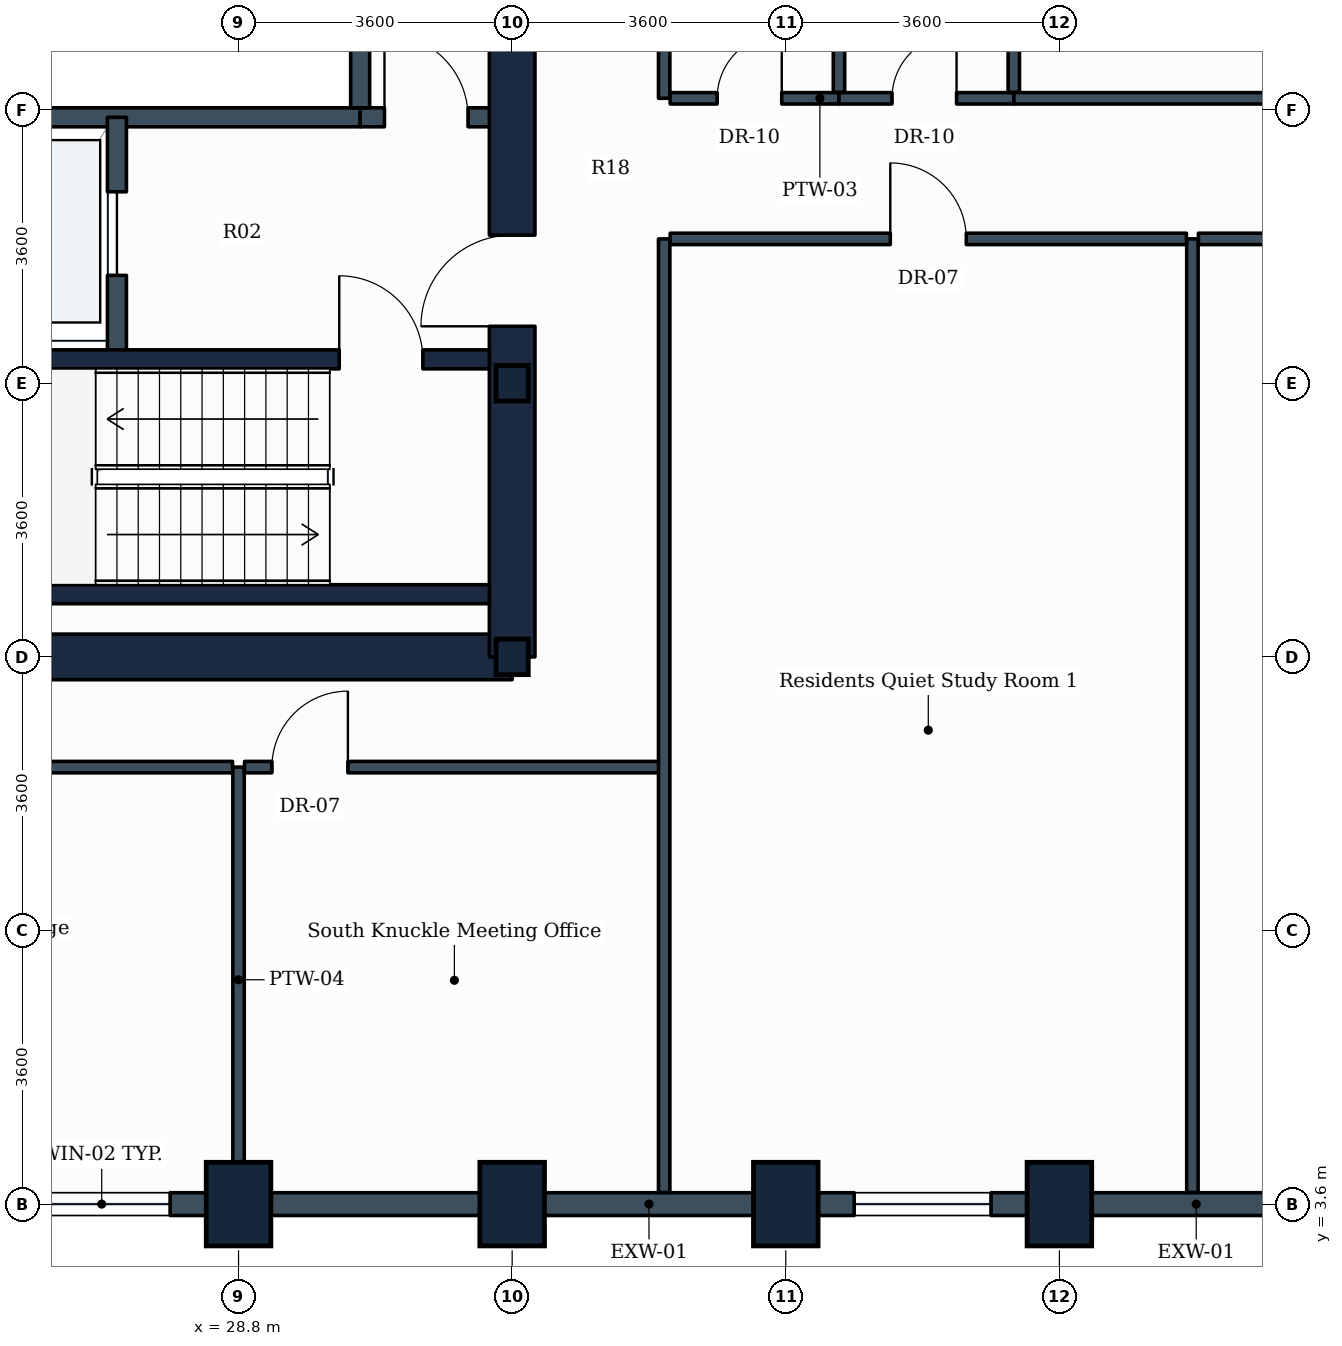
"""IFC4 building model, lengths in metres.
Left out: names, types, materials, properties, quantities, classifications, styles, units other than length and angle.
Written with IfcOpenShell. Run it as: python <this file> out.ifc"""

import sys

from ifc_helpers import new_model, si_unit, direction, frame, frame_2d, origin, origin_2d, place, context, subcontext, project, spatial, rectangle, i_section, extrude, element, fill, save


model = new_model("IFC4")
c1 = context("Model", 3, precision=1e-05, world=origin(), true_north=direction((0.0, 1.0)))
c2 = subcontext(c1, "Body", "Model", "MODEL_VIEW")
j1 = project(units=[si_unit("LENGTHUNIT", "METRE"), si_unit("PLANEANGLEUNIT", "RADIAN")], contexts=[c1])
p1 = place(None, origin())
s1 = spatial("IfcSite", under=j1, at=p1, CompositionType="ELEMENT")
p2 = place(p1, origin())
s2 = spatial("IfcBuilding", under=s1, at=p2, CompositionType="ELEMENT")
p3 = place(p2, frame((0.0, 0.0, 111.3)))
s3 = spatial("IfcBuildingStorey", under=s2, at=p3, CompositionType="ELEMENT", Elevation=111.3)
for number, where, z_axis, x_axis in (
    (1, (28.8, 3.6, 0.0), (0.0, 0.0, 1.0), (1.0, 0.0, 0.0)),
    (2, (32.4, 3.6, 0.0), (0.0, 0.0, 1.0), (1.0, 0.0, 0.0)),
):
    element("IfcColumn", number, at=place(p3, frame(where, z_axis=z_axis, x_axis=x_axis)), inside=s3, PredefinedType="COLUMN", context=c2, shape_type="SweptSolid", body=[
        extrude(rectangle(XDim=0.85, YDim=1.1, at=origin_2d()), origin(), (0.0, 0.0, 1.0), 3.9),
    ])
for number, where, z_axis, x_axis in (
    (3, (32.4, 10.8, 0.0), (0.0, 0.0, 1.0), (1.0, 0.0, 0.0)),
    (4, (32.4, 14.4, 0.0), (0.0, 0.0, 1.0), (1.0, 0.0, 0.0)),
):
    element("IfcColumn", number, at=place(p3, frame(where, z_axis=z_axis, x_axis=x_axis)), inside=s3, PredefinedType="COLUMN", context=c2, shape_type="SweptSolid", body=[
        extrude(i_section(OverallWidth=0.424, OverallDepth=0.467, WebThickness=0.033, FlangeThickness=0.053, FilletRadius=0.015, at=origin_2d()), origin(), (0.0, 0.0, 1.0), 3.9),
    ])
for number, where, z_axis, x_axis in (
    (5, (36.0, 3.6, 0.0), (0.0, 0.0, 1.0), (1.0, 0.0, 0.0)),
    (6, (39.6, 3.6, 0.0), (0.0, 0.0, 1.0), (1.0, 0.0, 0.0)),
):
    element("IfcColumn", number, at=place(p3, frame(where, z_axis=z_axis, x_axis=x_axis)), inside=s3, PredefinedType="COLUMN", context=c2, shape_type="SweptSolid", body=[
        extrude(rectangle(XDim=0.85, YDim=1.1, at=origin_2d()), origin(), (0.0, 0.0, 1.0), 3.9),
    ])
p4 = place(p3, frame((28.8, 3.6, 0.0), z_axis=(0.0, 0.0, 1.0), x_axis=(-1.0, 0.0, 0.0)))
e7 = element("IfcWall", 7, at=p4, inside=s3, PredefinedType="STANDARD", context=c2, shape_type="SweptSolid", body=[
    extrude(rectangle(XDim=3.6, YDim=0.3, at=frame_2d((1.8, 0.0))), origin(), (0.0, 0.0, 1.0), 3.03),
])
p5 = place(p4, frame((0.9, 0.0, 0.85)))
e8 = element("IfcOpeningElement", 8, at=p5, cuts=e7, PredefinedType="OPENING", context=c2, shape_type="SweptSolid", body=[
    extrude(rectangle(XDim=1.8, YDim=1.35, at=frame_2d((0.9, 0.675))), frame((0.0, 0.16, 0.0), z_axis=(0.0, -1.0, 0.0), x_axis=(1.0, 0.0, 0.0)), (0.0, 0.0, 1.0), 0.32),
])
p6 = place(p3, frame((32.4, 3.6, 0.0), z_axis=(0.0, 0.0, 1.0), x_axis=(-1.0, 0.0, 0.0)))
e9 = element("IfcWall", 9, at=p6, inside=s3, PredefinedType="STANDARD", context=c2, shape_type="SweptSolid", body=[
    extrude(rectangle(XDim=3.6, YDim=0.3, at=frame_2d((1.8, 0.0))), origin(), (0.0, 0.0, 1.0), 3.03),
])
p7 = place(p3, frame((36.0, 3.6, 0.0), z_axis=(0.0, 0.0, 1.0), x_axis=(-1.0, 0.0, 0.0)))
e10 = element("IfcWall", 10, at=p7, inside=s3, PredefinedType="STANDARD", context=c2, shape_type="SweptSolid", body=[
    extrude(rectangle(XDim=3.6, YDim=0.3, at=frame_2d((1.8, 0.0))), origin(), (0.0, 0.0, 1.0), 3.03),
])
p8 = place(p3, frame((39.6, 3.6, 0.0), z_axis=(0.0, 0.0, 1.0), x_axis=(-1.0, 0.0, 0.0)))
e11 = element("IfcWall", 11, at=p8, inside=s3, PredefinedType="STANDARD", context=c2, shape_type="SweptSolid", body=[
    extrude(rectangle(XDim=3.6, YDim=0.3, at=frame_2d((1.8, 0.0))), origin(), (0.0, 0.0, 1.0), 3.03),
])
p9 = place(p8, frame((0.9, 0.0, 0.85)))
e12 = element("IfcOpeningElement", 12, at=p9, cuts=e11, PredefinedType="OPENING", context=c2, shape_type="SweptSolid", body=[
    extrude(rectangle(XDim=1.8, YDim=1.35, at=frame_2d((0.9, 0.675))), frame((0.0, 0.16, 0.0), z_axis=(0.0, -1.0, 0.0), x_axis=(1.0, 0.0, 0.0)), (0.0, 0.0, 1.0), 0.32),
])
p10 = place(p3, frame((43.2, 3.6, 0.0), z_axis=(0.0, 0.0, 1.0), x_axis=(-1.0, 0.0, 0.0)))
e13 = element("IfcWall", 13, at=p10, inside=s3, PredefinedType="STANDARD", context=c2, shape_type="SweptSolid", body=[
    extrude(rectangle(XDim=3.6, YDim=0.3, at=frame_2d((1.8, 0.0))), origin(), (0.0, 0.0, 1.0), 3.03),
])
p11 = place(p3, frame((14.4, 10.8, 0.0), z_axis=(0.0, 0.0, 1.0), x_axis=(1.0, 0.0, 0.0)))
e14 = element("IfcWall", 14, at=p11, inside=s3, PredefinedType="SHEAR", context=c2, shape_type="SweptSolid", body=[
    extrude(rectangle(XDim=18.0, YDim=0.6, at=frame_2d((9.0, 0.0))), origin(), (0.0, 0.0, 1.0), 3.58),
])
p12 = place(p3, frame((32.4, 10.8, 0.0), z_axis=(0.0, 0.0, 1.0), x_axis=(0.0, 1.0, 0.0)))
e15 = element("IfcWall", 15, at=p12, inside=s3, PredefinedType="SHEAR", context=c2, shape_type="SweptSolid", body=[
    extrude(rectangle(XDim=14.4, YDim=0.6, at=frame_2d((7.2, 0.0))), origin(), (0.0, 0.0, 1.0), 3.58),
])
p13 = place(p12, frame((4.35, 0.0, 0.0)))
e16 = element("IfcOpeningElement", 16, at=p13, cuts=e15, PredefinedType="OPENING", context=c2, shape_type="SweptSolid", body=[
    extrude(rectangle(XDim=1.2, YDim=2.1, at=frame_2d((0.6, 1.05))), frame((0.0, 0.31, 0.0), z_axis=(0.0, -1.0, 0.0), x_axis=(1.0, 0.0, 0.0)), (0.0, 0.0, 1.0), 0.62),
])
p14 = place(p12, frame((10.0, 0.0, 0.0)))
e17 = element("IfcOpeningElement", 17, at=p14, cuts=e15, PredefinedType="OPENING", context=c2, shape_type="SweptSolid", body=[
    extrude(rectangle(XDim=1.2, YDim=2.1, at=frame_2d((0.6, 1.05))), frame((0.0, 0.31, 0.0), z_axis=(0.0, -1.0, 0.0), x_axis=(1.0, 0.0, 0.0)), (0.0, 0.0, 1.0), 0.62),
])
p15 = place(p3, frame((23.35, 11.625, 0.0), z_axis=(0.0, 0.0, 1.0), x_axis=(1.0, 0.0, 0.0)))
e18 = element("IfcWall", 18, at=p15, inside=s3, PredefinedType="SHEAR", context=c2, shape_type="SweptSolid", body=[
    extrude(rectangle(XDim=8.75, YDim=0.25, at=frame_2d((4.375, 0.0))), origin(), (0.0, 0.0, 1.0), 3.58),
])
p16 = place(p3, frame((23.35, 14.715, 0.0), z_axis=(0.0, 0.0, 1.0), x_axis=(1.0, 0.0, 0.0)))
e19 = element("IfcWall", 19, at=p16, inside=s3, PredefinedType="SHEAR", context=c2, shape_type="SweptSolid", body=[
    extrude(rectangle(XDim=8.75, YDim=0.25, at=frame_2d((4.375, 0.0))), origin(), (0.0, 0.0, 1.0), 3.58),
])
p17 = place(p16, frame((6.775, 0.0, 0.0)))
e20 = element("IfcOpeningElement", 20, at=p17, cuts=e19, PredefinedType="OPENING", context=c2, shape_type="SweptSolid", body=[
    extrude(rectangle(XDim=1.1, YDim=2.1, at=frame_2d((0.55, 1.05))), frame((0.0, 0.135, 0.0), z_axis=(0.0, -1.0, 0.0), x_axis=(1.0, 0.0, 0.0)), (0.0, 0.0, 1.0), 0.27),
])
p18 = place(p3, frame((21.88, 17.9, 0.0), z_axis=(0.0, 0.0, 1.0), x_axis=(1.0, 0.0, 0.0)))
e21 = element("IfcWall", 21, at=p18, inside=s3, PredefinedType="PARTITIONING", context=c2, shape_type="SweptSolid", body=[
    extrude(rectangle(XDim=8.52, YDim=0.25, at=frame_2d((4.26, 0.0))), origin(), (0.0, 0.0, 1.0), 3.565),
])
p19 = place(p3, frame((30.4, 17.9, 0.0), z_axis=(0.0, 0.0, 1.0), x_axis=(1.0, 0.0, 0.0)))
e22 = element("IfcWall", 22, at=p19, inside=s3, PredefinedType="PARTITIONING", context=c2, shape_type="SweptSolid", body=[
    extrude(rectangle(XDim=1.75, YDim=0.25, at=frame_2d((0.875, 0.0))), origin(), (0.0, 0.0, 1.0), 3.565),
])
p20 = place(p19, frame((0.32, 0.0, 0.0)))
e23 = element("IfcOpeningElement", 23, at=p20, cuts=e22, PredefinedType="OPENING", context=c2, shape_type="SweptSolid", body=[
    extrude(rectangle(XDim=1.1, YDim=2.1, at=frame_2d((0.55, 1.05))), frame((0.0, 0.135, 0.0), z_axis=(0.0, -1.0, 0.0), x_axis=(1.0, 0.0, 0.0)), (0.0, 0.0, 1.0), 0.27),
])
p21 = place(p3, frame((27.2, 14.84, 0.0), z_axis=(0.0, 0.0, 1.0), x_axis=(0.0, 1.0, 0.0)))
e24 = element("IfcWall", 24, at=p21, inside=s3, PredefinedType="PARTITIONING", context=c2, shape_type="SweptSolid", body=[
    extrude(rectangle(XDim=3.06, YDim=0.25, at=frame_2d((1.53, 0.0))), origin(), (0.0, 0.0, 1.0), 3.565),
])
p22 = place(p21, frame((0.98, 0.0, 0.0)))
e25 = element("IfcOpeningElement", 25, at=p22, cuts=e24, PredefinedType="OPENING", context=c2, shape_type="SweptSolid", body=[
    extrude(rectangle(XDim=1.1, YDim=2.1, at=frame_2d((0.55, 1.05))), frame((0.0, 0.135, 0.0), z_axis=(0.0, -1.0, 0.0), x_axis=(1.0, 0.0, 0.0)), (0.0, 0.0, 1.0), 0.27),
])
p23 = place(p3, frame((30.4, 18.025, 0.0), z_axis=(0.0, 0.0, 1.0), x_axis=(0.0, 1.0, 0.0)))
e26 = element("IfcWall", 26, at=p23, inside=s3, PredefinedType="PARTITIONING", context=c2, shape_type="SweptSolid", body=[
    extrude(rectangle(XDim=2.27, YDim=0.25, at=frame_2d((1.135, 0.0))), origin(), (0.0, 0.0, 1.0), 3.565),
])
p24 = place(p3, frame((34.4, 18.15, 0.0), z_axis=(0.0, 0.0, 1.0), x_axis=(0.0, 1.0, 0.0)))
e27 = element("IfcWall", 27, at=p24, inside=s3, PredefinedType="PARTITIONING", context=c2, shape_type="SweptSolid", body=[
    extrude(rectangle(XDim=6.896, YDim=0.15, at=frame_2d((3.448, 0.0))), origin(), (0.0, 0.0, 1.0), 3.03),
])
p25 = place(p3, frame((34.479, 18.15, 0.0), z_axis=(0.0, 0.0, 1.0), x_axis=(1.0, 0.0, 0.0)))
e28 = element("IfcWall", 28, at=p25, inside=s3, PredefinedType="PARTITIONING", context=c2, shape_type="SweptSolid", body=[
    extrude(rectangle(XDim=2.221, YDim=0.15, at=frame_2d((1.11, 0.0))), origin(), (0.0, 0.0, 1.0), 3.11),
])
p26 = place(p25, frame((0.618, 0.0, 0.0)))
e29 = element("IfcOpeningElement", 29, at=p26, cuts=e28, PredefinedType="OPENING", context=c2, shape_type="SweptSolid", body=[
    extrude(rectangle(XDim=0.85, YDim=2.1, at=frame_2d((0.425, 1.05))), frame((0.0, 0.085, 0.0), z_axis=(0.0, -1.0, 0.0), x_axis=(1.0, 0.0, 0.0)), (0.0, 0.0, 1.0), 0.17),
])
p27 = place(p3, frame((36.7, 18.229, 0.0), z_axis=(0.0, 0.0, 1.0), x_axis=(0.0, 1.0, 0.0)))
e30 = element("IfcWall", 30, at=p27, inside=s3, PredefinedType="PARTITIONING", context=c2, shape_type="SweptSolid", body=[
    extrude(rectangle(XDim=6.817, YDim=0.15, at=frame_2d((3.408, 0.0))), origin(), (0.0, 0.0, 1.0), 3.03),
])
p28 = place(p3, frame((36.7, 18.15, 0.0), z_axis=(0.0, 0.0, 1.0), x_axis=(1.0, 0.0, 0.0)))
e31 = element("IfcWall", 31, at=p28, inside=s3, PredefinedType="PARTITIONING", context=c2, shape_type="SweptSolid", body=[
    extrude(rectangle(XDim=2.3, YDim=0.15, at=frame_2d((1.15, 0.0))), origin(), (0.0, 0.0, 1.0), 3.2),
])
p29 = place(p28, frame((0.697, 0.0, 0.0)))
e32 = element("IfcOpeningElement", 32, at=p29, cuts=e31, PredefinedType="OPENING", context=c2, shape_type="SweptSolid", body=[
    extrude(rectangle(XDim=0.85, YDim=2.1, at=frame_2d((0.425, 1.05))), frame((0.0, 0.085, 0.0), z_axis=(0.0, -1.0, 0.0), x_axis=(1.0, 0.0, 0.0)), (0.0, 0.0, 1.0), 0.17),
])
p30 = place(p3, frame((39.0, 18.229, 0.0), z_axis=(0.0, 0.0, 1.0), x_axis=(0.0, 1.0, 0.0)))
e33 = element("IfcWall", 33, at=p30, inside=s3, PredefinedType="PARTITIONING", context=c2, shape_type="SweptSolid", body=[
    extrude(rectangle(XDim=3.821, YDim=0.15, at=frame_2d((1.911, 0.0))), origin(), (0.0, 0.0, 1.0), 3.11),
])
p31 = place(p3, frame((28.8, 9.35, 0.0), z_axis=(0.0, 0.0, 1.0), x_axis=(0.0, -1.0, 0.0)))
e34 = element("IfcWall", 34, at=p31, inside=s3, PredefinedType="PARTITIONING", context=c2, shape_type="SweptSolid", body=[
    extrude(rectangle(XDim=5.596, YDim=0.15, at=frame_2d((2.798, 0.0))), origin(), (0.0, 0.0, 1.0), 3.565),
])
p32 = place(p3, frame((13.08, 9.35, 0.0), z_axis=(0.0, 0.0, 1.0), x_axis=(1.0, 0.0, 0.0)))
e35 = element("IfcWall", 35, at=p32, inside=s3, PredefinedType="PARTITIONING", context=c2, shape_type="SweptSolid", body=[
    extrude(rectangle(XDim=15.641, YDim=0.15, at=frame_2d((7.82, 0.0))), origin(), (0.0, 0.0, 1.0), 3.11),
])
p33 = place(p3, frame((28.879, 9.35, 0.0), z_axis=(0.0, 0.0, 1.0), x_axis=(1.0, 0.0, 0.0)))
e36 = element("IfcWall", 36, at=p33, inside=s3, PredefinedType="PARTITIONING", context=c2, shape_type="SweptSolid", body=[
    extrude(rectangle(XDim=5.521, YDim=0.15, at=frame_2d((2.76, 0.0))), origin(), (0.0, 0.0, 1.0), 3.565),
])
p34 = place(p33, frame((0.36, 0.0, 0.0)))
e37 = element("IfcOpeningElement", 37, at=p34, cuts=e36, PredefinedType="OPENING", context=c2, shape_type="SweptSolid", body=[
    extrude(rectangle(XDim=1.0, YDim=2.1, at=frame_2d((0.5, 1.05))), frame((0.0, 0.085, 0.0), z_axis=(0.0, -1.0, 0.0), x_axis=(1.0, 0.0, 0.0)), (0.0, 0.0, 1.0), 0.17),
])
for number, where, z_axis, x_axis in (
    (38, (34.4, 3.754, 0.0), (0.0, 0.0, 1.0), (0.0, 1.0, 0.0)),
    (39, (41.35, 3.754, 0.0), (0.0, 0.0, 1.0), (0.0, 1.0, 0.0)),
):
    element("IfcWall", number, at=place(p3, frame(where, z_axis=z_axis, x_axis=x_axis)), inside=s3, PredefinedType="PARTITIONING", context=c2, shape_type="SweptSolid", body=[
        extrude(rectangle(XDim=12.546, YDim=0.15, at=frame_2d((6.273, 0.0))), origin(), (0.0, 0.0, 1.0), 3.03),
    ])
p35 = place(p3, frame((34.479, 16.3, 0.0), z_axis=(0.0, 0.0, 1.0), x_axis=(1.0, 0.0, 0.0)))
e40 = element("IfcWall", 40, at=p35, inside=s3, PredefinedType="PARTITIONING", context=c2, shape_type="SweptSolid", body=[
    extrude(rectangle(XDim=6.792, YDim=0.15, at=frame_2d((3.396, 0.0))), origin(), (0.0, 0.0, 1.0), 3.11),
])
p36 = place(p35, frame((2.896, 0.0, 0.0)))
e41 = element("IfcOpeningElement", 41, at=p36, cuts=e40, PredefinedType="OPENING", context=c2, shape_type="SweptSolid", body=[
    extrude(rectangle(XDim=1.0, YDim=2.1, at=frame_2d((0.5, 1.05))), frame((0.0, 0.085, 0.0), z_axis=(0.0, -1.0, 0.0), x_axis=(1.0, 0.0, 0.0)), (0.0, 0.0, 1.0), 0.17),
])
p37 = place(p3, frame((41.429, 16.3, 0.0), z_axis=(0.0, 0.0, 1.0), x_axis=(1.0, 0.0, 0.0)))
e42 = element("IfcWall", 42, at=p37, inside=s3, PredefinedType="PARTITIONING", context=c2, shape_type="SweptSolid", body=[
    extrude(rectangle(XDim=7.042, YDim=0.15, at=frame_2d((3.521, 0.0))), origin(), (0.0, 0.0, 1.0), 3.12),
])
p38 = place(p37, frame((4.331, 0.0, 0.0)))
e43 = element("IfcOpeningElement", 43, at=p38, cuts=e42, PredefinedType="OPENING", context=c2, shape_type="SweptSolid", body=[
    extrude(rectangle(XDim=1.0, YDim=2.1, at=frame_2d((0.5, 1.05))), frame((0.0, 0.085, 0.0), z_axis=(0.0, -1.0, 0.0), x_axis=(1.0, 0.0, 0.0)), (0.0, 0.0, 1.0), 0.17),
])
p39 = place(p3, frame((39.0, 18.15, 0.0), z_axis=(0.0, 0.0, 1.0), x_axis=(1.0, 0.0, 0.0)))
e44 = element("IfcWall", 44, at=p39, inside=s3, PredefinedType="PARTITIONING", context=c2, shape_type="SweptSolid", body=[
    extrude(rectangle(XDim=7.731, YDim=0.15, at=frame_2d((3.865, 0.0))), origin(), (0.0, 0.0, 1.0), 3.11),
])
p40 = place(p39, frame((3.365, 0.0, 0.0)))
e45 = element("IfcOpeningElement", 45, at=p40, cuts=e44, PredefinedType="OPENING", context=c2, shape_type="SweptSolid", body=[
    extrude(rectangle(XDim=1.0, YDim=2.1, at=frame_2d((0.5, 1.05))), frame((0.0, 0.085, 0.0), z_axis=(0.0, -1.0, 0.0), x_axis=(1.0, 0.0, 0.0)), (0.0, 0.0, 1.0), 0.17),
])
p41 = place(p5, origin())
e46 = element("IfcWindow", 46, at=p41, inside=s3, PartitioningType="SINGLE_PANEL", PredefinedType="WINDOW", context=c2, shape_type="SweptSolid", body=[
    extrude(rectangle(XDim=1.8, YDim=1.35, at=frame_2d((0.9, 0.675))), frame((0.0, 0.03, 0.0), z_axis=(0.0, -1.0, 0.0), x_axis=(1.0, 0.0, 0.0)), (0.0, 0.0, 1.0), 0.06),
])
fill(e8, e46)
p42 = place(p9, origin())
e47 = element("IfcWindow", 47, at=p42, inside=s3, PartitioningType="SINGLE_PANEL", PredefinedType="WINDOW", context=c2, shape_type="SweptSolid", body=[
    extrude(rectangle(XDim=1.8, YDim=1.35, at=frame_2d((0.9, 0.675))), frame((0.0, 0.03, 0.0), z_axis=(0.0, -1.0, 0.0), x_axis=(1.0, 0.0, 0.0)), (0.0, 0.0, 1.0), 0.06),
])
fill(e12, e47)
p43 = place(p17, origin())
e48 = element("IfcDoor", 48, at=p43, inside=s3, OperationType="SINGLE_SWING_LEFT", PredefinedType="DOOR", context=c2, shape_type="SweptSolid", body=[
    extrude(rectangle(XDim=1.1, YDim=2.1, at=frame_2d((0.55, 1.05))), frame((0.0, 0.025, 0.0), z_axis=(0.0, -1.0, 0.0), x_axis=(1.0, 0.0, 0.0)), (0.0, 0.0, 1.0), 0.05),
])
fill(e20, e48)
p44 = place(p22, origin())
e49 = element("IfcDoor", 49, at=p44, inside=s3, OperationType="SLIDING_TO_LEFT", PredefinedType="DOOR", context=c2, shape_type="SweptSolid", body=[
    extrude(rectangle(XDim=1.1, YDim=2.1, at=frame_2d((0.55, 1.05))), frame((0.0, 0.025, 0.0), z_axis=(0.0, -1.0, 0.0), x_axis=(1.0, 0.0, 0.0)), (0.0, 0.0, 1.0), 0.05),
])
fill(e25, e49)
p45 = place(p13, origin())
e50 = element("IfcDoor", 50, at=p45, inside=s3, OperationType="SINGLE_SWING_LEFT", PredefinedType="DOOR", context=c2, shape_type="SweptSolid", body=[
    extrude(rectangle(XDim=1.2, YDim=2.1, at=frame_2d((0.6, 1.05))), frame((0.0, 0.025, 0.0), z_axis=(0.0, -1.0, 0.0), x_axis=(1.0, 0.0, 0.0)), (0.0, 0.0, 1.0), 0.05),
])
fill(e16, e50)
p46 = place(p20, origin())
e51 = element("IfcDoor", 51, at=p46, inside=s3, OperationType="SINGLE_SWING_LEFT", PredefinedType="DOOR", context=c2, shape_type="SweptSolid", body=[
    extrude(rectangle(XDim=1.1, YDim=2.1, at=frame_2d((0.55, 1.05))), frame((0.0, 0.025, 0.0), z_axis=(0.0, -1.0, 0.0), x_axis=(1.0, 0.0, 0.0)), (0.0, 0.0, 1.0), 0.05),
])
fill(e23, e51)
p47 = place(p26, origin())
e52 = element("IfcDoor", 52, at=p47, inside=s3, OperationType="SINGLE_SWING_RIGHT", PredefinedType="DOOR", context=c2, shape_type="SweptSolid", body=[
    extrude(rectangle(XDim=0.85, YDim=2.1, at=frame_2d((0.425, 1.05))), frame((0.0, 0.025, 0.0), z_axis=(0.0, -1.0, 0.0), x_axis=(1.0, 0.0, 0.0)), (0.0, 0.0, 1.0), 0.05),
])
fill(e29, e52)
p48 = place(p29, origin())
e53 = element("IfcDoor", 53, at=p48, inside=s3, OperationType="SINGLE_SWING_RIGHT", PredefinedType="DOOR", context=c2, shape_type="SweptSolid", body=[
    extrude(rectangle(XDim=0.85, YDim=2.1, at=frame_2d((0.425, 1.05))), frame((0.0, 0.025, 0.0), z_axis=(0.0, -1.0, 0.0), x_axis=(1.0, 0.0, 0.0)), (0.0, 0.0, 1.0), 0.05),
])
fill(e32, e53)
p49 = place(p34, origin())
e54 = element("IfcDoor", 54, at=p49, inside=s3, OperationType="SINGLE_SWING_RIGHT", PredefinedType="DOOR", context=c2, shape_type="SweptSolid", body=[
    extrude(rectangle(XDim=1.0, YDim=2.1, at=frame_2d((0.5, 1.05))), frame((0.0, 0.025, 0.0), z_axis=(0.0, -1.0, 0.0), x_axis=(1.0, 0.0, 0.0)), (0.0, 0.0, 1.0), 0.05),
])
fill(e37, e54)
p50 = place(p36, origin())
e55 = element("IfcDoor", 55, at=p50, inside=s3, OperationType="SINGLE_SWING_LEFT", PredefinedType="DOOR", context=c2, shape_type="SweptSolid", body=[
    extrude(rectangle(XDim=1.0, YDim=2.1, at=frame_2d((0.5, 1.05))), frame((0.0, 0.025, 0.0), z_axis=(0.0, -1.0, 0.0), x_axis=(1.0, 0.0, 0.0)), (0.0, 0.0, 1.0), 0.05),
])
fill(e41, e55)
save(model, sys.argv[1])
